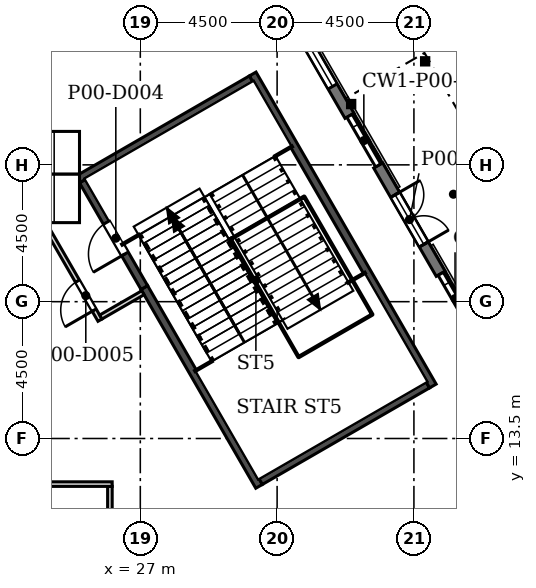
"""IFC4 building model, lengths in metres.
Left out: names, types, materials, properties, quantities, classifications, styles, units other than length and angle.
Written with IfcOpenShell. Run it as: python <this file> out.ifc"""

import sys

from ifc_helpers import new_model, si_unit, direction, frame, frame_2d, origin, origin_2d, place, context, subcontext, project, spatial, rectangle, hollow_circle, extrude, element, fill, save


model = new_model("IFC4")
c1 = context("Model", 3, precision=1e-05, world=origin(), true_north=direction((0.0, 1.0)))
c2 = subcontext(c1, "Body", "Model", "MODEL_VIEW")
j1 = project(units=[si_unit("LENGTHUNIT", "METRE"), si_unit("PLANEANGLEUNIT", "RADIAN")], contexts=[c1])
p1 = place(None, origin())
s1 = spatial("IfcSite", under=j1, at=p1, CompositionType="ELEMENT")
p2 = place(p1, origin())
s2 = spatial("IfcBuilding", under=s1, at=p2, CompositionType="ELEMENT")
p3 = place(p2, origin())
s3 = spatial("IfcBuildingStorey", under=s2, at=p3, CompositionType="ELEMENT", Elevation=0.0)
p4 = place(p3, frame((36.882, 18.918, 0.0), z_axis=(0.0, 0.0, 1.0), x_axis=(-0.500018604663, 0.866014662111, 0.0)))
e1 = element("IfcWall", 1, at=p4, inside=s3, PredefinedType="SOLIDWALL", context=c2, shape_type="SweptSolid", body=[
    extrude(rectangle(XDim=4.115, YDim=0.34, at=frame_2d((2.058, 0.0))), origin(), (0.0, 0.0, 1.0), 7.7),
])
p5 = place(p4, frame((1.115, 0.0, 0.0)))
e2 = element("IfcOpeningElement", 2, at=p5, cuts=e1, PredefinedType="OPENING", context=c2, shape_type="SweptSolid", body=[
    extrude(rectangle(XDim=1.885, YDim=2.4, at=frame_2d((0.942, 1.2))), frame((0.0, 0.18, 0.0), z_axis=(0.0, -1.0, 0.0), x_axis=(1.0, 0.0, 0.0)), (0.0, 0.0, 1.0), 0.36),
])
p6 = place(p4, frame((1.115, 0.0, 2.6)))
e3 = element("IfcOpeningElement", 3, at=p6, cuts=e1, PredefinedType="OPENING", context=c2, shape_type="SweptSolid", body=[
    extrude(rectangle(XDim=1.885, YDim=4.8, at=frame_2d((0.942, 2.4))), frame((0.0, 0.18, 0.0), z_axis=(0.0, -1.0, 0.0), x_axis=(1.0, 0.0, 0.0)), (0.0, 0.0, 1.0), 0.36),
])
p7 = place(p3, frame((33.882, 24.114, 0.0), z_axis=(0.0, 0.0, 1.0), x_axis=(-0.500002868947, 0.866023747391, 0.0)))
e4 = element("IfcWall", 4, at=p7, inside=s3, PredefinedType="SOLIDWALL", context=c2, shape_type="SweptSolid", body=[
    extrude(rectangle(XDim=34.115, YDim=0.34, at=frame_2d((17.058, 0.0))), origin(), (0.0, 0.0, 1.0), 7.7),
])
p8 = place(p7, frame((1.115, 0.0, 0.9)))
e5 = element("IfcOpeningElement", 5, at=p8, cuts=e4, PredefinedType="OPENING", context=c2, shape_type="SweptSolid", body=[
    extrude(rectangle(XDim=1.885, YDim=3.5, at=frame_2d((0.942, 1.75))), frame((0.0, 0.18, 0.0), z_axis=(0.0, -1.0, 0.0), x_axis=(1.0, 0.0, 0.0)), (0.0, 0.0, 1.0), 0.36),
])
p9 = place(p7, frame((4.115, 0.0, 0.9)))
e6 = element("IfcOpeningElement", 6, at=p9, cuts=e4, PredefinedType="OPENING", context=c2, shape_type="SweptSolid", body=[
    extrude(rectangle(XDim=1.885, YDim=3.5, at=frame_2d((0.942, 1.75))), frame((0.0, 0.18, 0.0), z_axis=(0.0, -1.0, 0.0), x_axis=(1.0, 0.0, 0.0)), (0.0, 0.0, 1.0), 0.36),
])
p10 = place(p7, frame((22.115, 0.0, 0.9)))
e7 = element("IfcOpeningElement", 7, at=p10, cuts=e4, PredefinedType="OPENING", context=c2, shape_type="SweptSolid", body=[
    extrude(rectangle(XDim=1.885, YDim=3.5, at=frame_2d((0.942, 1.75))), frame((0.0, 0.18, 0.0), z_axis=(0.0, -1.0, 0.0), x_axis=(1.0, 0.0, 0.0)), (0.0, 0.0, 1.0), 0.36),
])
p11 = place(p7, frame((25.115, 0.0, 0.9)))
e8 = element("IfcOpeningElement", 8, at=p11, cuts=e4, PredefinedType="OPENING", context=c2, shape_type="SweptSolid", body=[
    extrude(rectangle(XDim=1.885, YDim=3.5, at=frame_2d((0.942, 1.75))), frame((0.0, 0.18, 0.0), z_axis=(0.0, -1.0, 0.0), x_axis=(1.0, 0.0, 0.0)), (0.0, 0.0, 1.0), 0.36),
])
p12 = place(p7, frame((7.378, 0.0, 0.0)))
e9 = element("IfcOpeningElement", 9, at=p12, cuts=e4, PredefinedType="OPENING", context=c2, shape_type="SweptSolid", body=[
    extrude(rectangle(XDim=2.4, YDim=2.7, at=frame_2d((1.2, 1.35))), frame((0.0, 0.18, 0.0), z_axis=(0.0, -1.0, 0.0), x_axis=(1.0, 0.0, 0.0)), (0.0, 0.0, 1.0), 0.36),
])
p13 = place(p7, frame((18.857, 0.0, 0.0)))
e10 = element("IfcOpeningElement", 10, at=p13, cuts=e4, PredefinedType="OPENING", context=c2, shape_type="SweptSolid", body=[
    extrude(rectangle(XDim=2.4, YDim=2.7, at=frame_2d((1.2, 1.35))), frame((0.0, 0.18, 0.0), z_axis=(0.0, -1.0, 0.0), x_axis=(1.0, 0.0, 0.0)), (0.0, 0.0, 1.0), 0.36),
])
p14 = place(p7, frame((30.336, 0.0, 0.0)))
e11 = element("IfcOpeningElement", 11, at=p14, cuts=e4, PredefinedType="OPENING", context=c2, shape_type="SweptSolid", body=[
    extrude(rectangle(XDim=2.4, YDim=2.7, at=frame_2d((1.2, 1.35))), frame((0.0, 0.18, 0.0), z_axis=(0.0, -1.0, 0.0), x_axis=(1.0, 0.0, 0.0)), (0.0, 0.0, 1.0), 0.36),
])
p15 = place(p7, frame((12.215, 0.0, 0.0)))
e12 = element("IfcOpeningElement", 12, at=p15, cuts=e4, PredefinedType="OPENING", context=c2, shape_type="SweptSolid", body=[
    extrude(rectangle(XDim=4.885, YDim=4.5, at=frame_2d((2.442, 2.25))), frame((0.0, 0.18, 0.0), z_axis=(0.0, -1.0, 0.0), x_axis=(1.0, 0.0, 0.0)), (0.0, 0.0, 1.0), 0.36),
])
for number, where, z_axis, x_axis in (
    (13, (36.369, 25.905, 0.0), (0.0, 0.0, 1.0), (1.0, 0.0, 0.0)),
    (14, (33.936, 24.5, 0.0), (0.0, 0.0, 1.0), (1.0, 0.0, 0.0)),
):
    element("IfcColumn", number, at=place(p3, frame(where, z_axis=z_axis, x_axis=x_axis)), inside=s3, PredefinedType="COLUMN", context=c2, shape_type="SweptSolid", body=[
        extrude(hollow_circle(Radius=0.07, WallThickness=0.008, at=origin_2d()), origin(), (0.0, 0.0, 1.0), 4.45),
    ])
p16 = place(p3, frame((26.0, 11.925, 0.0), z_axis=(0.0, 0.0, 1.0), x_axis=(0.0, -1.0, 0.0)))
e15 = element("IfcWall", 15, at=p16, inside=s3, PredefinedType="PARTITIONING", context=c2, shape_type="SweptSolid", body=[
    extrude(rectangle(XDim=1.85, YDim=0.15, at=frame_2d((0.925, 0.0))), origin(), (0.0, 0.0, 1.0), 7.7),
])
p17 = place(p3, frame((30.907, 11.927, 0.0), z_axis=(0.0, 0.0, 1.0), x_axis=(-0.499985572004, 0.866033733632, 0.0)))
e16 = element("IfcWall", 16, at=p17, inside=s3, PredefinedType="SOLIDWALL", context=c2, shape_type="SweptSolid", body=[
    extrude(rectangle(XDim=7.55, YDim=0.25, at=frame_2d((3.775, 0.0))), origin(), (0.0, 0.0, 1.0), 7.7),
])
p18 = place(p3, frame((13.925, 12.0, 0.0), z_axis=(0.0, 0.0, 1.0), x_axis=(1.0, 0.0, 0.0)))
e17 = element("IfcWall", 17, at=p18, inside=s3, PredefinedType="PARTITIONING", context=c2, shape_type="SweptSolid", body=[
    extrude(rectangle(XDim=12.15, YDim=0.15, at=frame_2d((6.075, 0.0))), origin(), (0.0, 0.0, 1.0), 7.7),
])
p19 = place(p18, frame((5.175, 0.0, 0.0)))
e18 = element("IfcOpeningElement", 18, at=p19, cuts=e17, PredefinedType="OPENING", context=c2, shape_type="SweptSolid", body=[
    extrude(rectangle(XDim=1.8, YDim=2.1, at=frame_2d((0.9, 1.05))), frame((0.0, 0.085, 0.0), z_axis=(0.0, -1.0, 0.0), x_axis=(1.0, 0.0, 0.0)), (0.0, 0.0, 1.0), 0.17),
])
p20 = place(p3, frame((36.452, 15.272, 0.0), z_axis=(0.0, 0.0, 1.0), x_axis=(-0.866041542834, -0.499972045304, 0.0)))
e19 = element("IfcWall", 19, at=p20, inside=s3, PredefinedType="SOLIDWALL", context=c2, shape_type="SweptSolid", body=[
    extrude(rectangle(XDim=6.35, YDim=0.25, at=frame_2d((3.175, 0.0))), origin(), (0.0, 0.0, 1.0), 7.7),
])
p21 = place(p3, frame((25.673, 17.392, 0.0), z_axis=(0.0, 0.0, 1.0), x_axis=(-0.499958946799, 0.866049104564, 0.0)))
e20 = element("IfcWall", 20, at=p21, inside=s3, PredefinedType="PARTITIONING", context=c2, shape_type="SweptSolid", body=[
    extrude(rectangle(XDim=3.664, YDim=0.15, at=frame_2d((1.832, 0.0))), origin(), (0.0, 0.0, 1.0), 7.7),
])
p22 = place(p21, frame((0.382, 0.0, 0.0)))
e21 = element("IfcOpeningElement", 21, at=p22, cuts=e20, PredefinedType="OPENING", context=c2, shape_type="SweptSolid", body=[
    extrude(rectangle(XDim=1.1, YDim=2.1, at=frame_2d((0.55, 1.05))), frame((0.0, 0.085, 0.0), z_axis=(0.0, -1.0, 0.0), x_axis=(1.0, 0.0, 0.0)), (0.0, 0.0, 1.0), 0.17),
])
p23 = place(p3, frame((27.087, 18.294, 0.0), z_axis=(0.0, 0.0, 1.0), x_axis=(-0.866066190972, -0.499929347863, 0.0)))
e22 = element("IfcWall", 22, at=p23, inside=s3, PredefinedType="PARTITIONING", context=c2, shape_type="SweptSolid", body=[
    extrude(rectangle(XDim=1.6, YDim=0.15, at=frame_2d((0.8, 0.0))), origin(), (0.0, 0.0, 1.0), 7.7),
])
p24 = place(p3, frame((27.132, 18.465, 0.0), z_axis=(0.0, 0.0, 1.0), x_axis=(-0.499971214291, 0.866042022584, 0.0)))
e23 = element("IfcWall", 23, at=p24, inside=s3, PredefinedType="SOLIDWALL", context=c2, shape_type="SweptSolid", body=[
    extrude(rectangle(XDim=4.05, YDim=0.25, at=frame_2d((2.025, 0.0))), origin(), (0.0, 0.0, 1.0), 7.7),
])
p25 = place(p24, frame((1.275, 0.0, 0.0)))
e24 = element("IfcOpeningElement", 24, at=p25, cuts=e23, PredefinedType="OPENING", context=c2, shape_type="SweptSolid", body=[
    extrude(rectangle(XDim=1.2, YDim=2.1, at=frame_2d((0.6, 1.05))), frame((0.0, 0.135, 0.0), z_axis=(0.0, -1.0, 0.0), x_axis=(1.0, 0.0, 0.0)), (0.0, 0.0, 1.0), 0.27),
])
p26 = place(p3, frame((24.936, 22.018, 0.0), z_axis=(0.0, 0.0, 1.0), x_axis=(0.866040211805, 0.499974350878, 0.0)))
e25 = element("IfcWall", 25, at=p26, inside=s3, PredefinedType="SOLIDWALL", context=c2, shape_type="SweptSolid", body=[
    extrude(rectangle(XDim=6.6, YDim=0.25, at=frame_2d((3.3, 0.0))), origin(), (0.0, 0.0, 1.0), 7.7),
])
p27 = place(p3, frame((30.698, 25.489, 0.0), z_axis=(0.0, 0.0, 1.0), x_axis=(0.499976885332, -0.866038748633, 0.0)))
e26 = element("IfcWall", 26, at=p27, inside=s3, PredefinedType="SOLIDWALL", context=c2, shape_type="SweptSolid", body=[
    extrude(rectangle(XDim=11.85, YDim=0.25, at=frame_2d((5.925, 0.0))), origin(), (0.0, 0.0, 1.0), 7.7),
])
p28 = place(p5, frame((1.885, 0.0, 0.0), z_axis=(0.0, 0.0, 1.0), x_axis=(-1.0, 0.0, 0.0)))
e27 = element("IfcDoor", 27, at=p28, inside=s3, OperationType="DOUBLE_DOOR_SINGLE_SWING", PredefinedType="DOOR", context=c2, shape_type="SweptSolid", body=[
    extrude(rectangle(XDim=1.885, YDim=2.4, at=frame_2d((0.942, 1.2))), frame((0.0, 0.025, 0.0), z_axis=(0.0, -1.0, 0.0), x_axis=(1.0, 0.0, 0.0)), (0.0, 0.0, 1.0), 0.05),
])
fill(e2, e27)
p29 = place(p6, origin())
e28 = element("IfcWindow", 28, at=p29, inside=s3, PartitioningType="SINGLE_PANEL", PredefinedType="WINDOW", context=c2, shape_type="SweptSolid", body=[
    extrude(rectangle(XDim=1.885, YDim=4.8, at=frame_2d((0.942, 2.4))), frame((0.0, 0.11, 0.0), z_axis=(0.0, -1.0, 0.0), x_axis=(1.0, 0.0, 0.0)), (0.0, 0.0, 1.0), 0.06),
])
fill(e3, e28)
p30 = place(p8, origin())
e29 = element("IfcWindow", 29, at=p30, inside=s3, PartitioningType="SINGLE_PANEL", PredefinedType="WINDOW", context=c2, shape_type="SweptSolid", body=[
    extrude(rectangle(XDim=1.885, YDim=3.5, at=frame_2d((0.942, 1.75))), frame((0.0, 0.11, 0.0), z_axis=(0.0, -1.0, 0.0), x_axis=(1.0, 0.0, 0.0)), (0.0, 0.0, 1.0), 0.06),
])
fill(e5, e29)
p31 = place(p25, origin())
e30 = element("IfcDoor", 30, at=p31, inside=s3, OperationType="SINGLE_SWING_LEFT", PredefinedType="DOOR", context=c2, shape_type="SweptSolid", body=[
    extrude(rectangle(XDim=1.2, YDim=2.1, at=frame_2d((0.6, 1.05))), frame((0.0, 0.025, 0.0), z_axis=(0.0, -1.0, 0.0), x_axis=(1.0, 0.0, 0.0)), (0.0, 0.0, 1.0), 0.05),
])
fill(e24, e30)
p32 = place(p22, origin())
e31 = element("IfcDoor", 31, at=p32, inside=s3, OperationType="SINGLE_SWING_LEFT", PredefinedType="DOOR", context=c2, shape_type="SweptSolid", body=[
    extrude(rectangle(XDim=1.1, YDim=2.1, at=frame_2d((0.55, 1.05))), frame((0.0, 0.025, 0.0), z_axis=(0.0, -1.0, 0.0), x_axis=(1.0, 0.0, 0.0)), (0.0, 0.0, 1.0), 0.05),
])
fill(e21, e31)
save(model, sys.argv[1])
